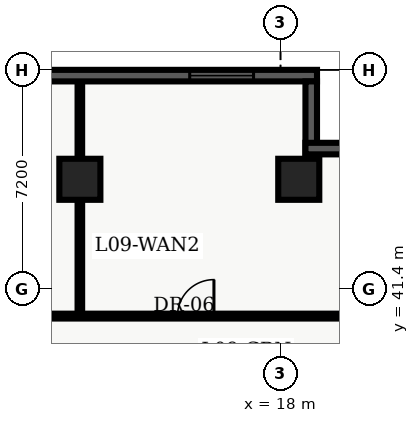
"""IFC4 building model, lengths in metres.
Left out: names, types, materials, properties, quantities, classifications, styles, units other than length and angle.
Written with IfcOpenShell. Run it as: python <this file> out.ifc"""

import sys

from ifc_helpers import new_model, entity, si_unit, converted_unit, direction, frame, origin_with_axes, origin_2d_with_axis, place, context, subcontext, project, spatial, polyline, rectangle, outline, extrude, element, fill, save


model = new_model("IFC4")
c1 = context("Model", 3, precision=1e-05, world=origin_with_axes(), true_north=direction((0.0, 1.0)))
c2 = subcontext(c1, "Body", "Model", "MODEL_VIEW")
j1 = project(units=[si_unit("LENGTHUNIT", "METRE"), converted_unit("PLANEANGLEUNIT", "DEGREE", entity("IfcPlaneAngleMeasure", 0.017), si_unit("PLANEANGLEUNIT", "RADIAN"), dimensions=[0, 0, 0, 0, 0, 0, 0])], contexts=[c1])
p1 = place(None, origin_with_axes())
s1 = spatial("IfcSite", under=j1, at=p1, CompositionType="ELEMENT")
p2 = place(p1, origin_with_axes())
s2 = spatial("IfcBuilding", under=s1, at=p2, CompositionType="ELEMENT")
p3 = place(p2, frame((0.0, 0.0, 40.5), z_axis=(0.0, 0.0, 1.0), x_axis=(1.0, 0.0, 0.0)))
s3 = spatial("IfcBuildingStorey", under=s2, at=p3, CompositionType="ELEMENT", Elevation=40.5)
for number, where, z_axis, x_axis in (
    (1, (11.4, 45.0, 0.0), (0.0, 0.0, 1.0), (1.0, 0.0, 0.0)),
    (2, (18.6, 45.0, 0.0), (0.0, 0.0, 1.0), (1.0, 0.0, 0.0)),
):
    element("IfcColumn", number, at=place(p3, frame(where, z_axis=z_axis, x_axis=x_axis)), inside=s3, PredefinedType="COLUMN", context=c2, shape_type="SweptSolid", body=[
        extrude(rectangle(XDim=1.35, YDim=1.35, at=origin_2d_with_axis()), origin_with_axes(), (0.0, 0.0, 1.0), 3.9),
    ])
p4 = place(p3, frame((2.6, 40.5, 0.0), z_axis=(0.0, 0.0, 1.0), x_axis=(1.0, 0.0, 0.0)))
e3 = element("IfcWall", 3, at=p4, inside=s3, PredefinedType="PARTITIONING", context=c2, shape_type="SweptSolid", body=[
    extrude(outline(polyline([(0.0, -0.08), (18.65, -0.08), (18.65, 0.08), (0.0, 0.08), (0.0, -0.08)])), origin_with_axes(), (0.0, 0.0, 1.0), 2.7),
])
p5 = place(p4, frame((5.275, 0.0, 0.0), z_axis=(0.0, 0.0, 1.0), x_axis=(1.0, 0.0, 0.0)))
e4 = element("IfcOpeningElement", 4, at=p5, cuts=e3, PredefinedType="OPENING", context=c2, shape_type="SweptSolid", body=[
    extrude(rectangle(XDim=1.0, YDim=0.18, at=origin_2d_with_axis()), origin_with_axes(), (0.0, 0.0, 1.0), 2.15),
])
p6 = place(p4, frame((12.61, 0.0, 0.0), z_axis=(0.0, 0.0, 1.0), x_axis=(1.0, 0.0, 0.0)))
e5 = element("IfcOpeningElement", 5, at=p6, cuts=e3, PredefinedType="OPENING", context=c2, shape_type="SweptSolid", body=[
    extrude(rectangle(XDim=1.2, YDim=0.18, at=origin_2d_with_axis()), origin_with_axes(), (0.0, 0.0, 1.0), 2.2),
])
p7 = place(p3, frame((11.4, 40.6, 0.0), z_axis=(0.0, 0.0, 1.0), x_axis=(0.0, 1.0, 0.0)))
e6 = element("IfcWall", 6, at=p7, inside=s3, PredefinedType="PARTITIONING", context=c2, shape_type="SweptSolid", body=[
    extrude(outline(polyline([(0.0, -0.075), (7.64, -0.075), (7.64, 0.075), (0.0, 0.075), (0.0, -0.075)])), origin_with_axes(), (0.0, 0.0, 1.0), 2.7),
])
p8 = place(p3, frame((2.78, 48.41, 0.0), z_axis=(0.0, 0.0, 1.0), x_axis=(1.0, 0.0, 0.0)))
e7 = element("IfcWall", 7, at=p8, inside=s3, PredefinedType="SOLIDWALL", context=c2, shape_type="SweptSolid", body=[
    extrude(outline(polyline([(0.0, -0.19), (16.42, -0.19), (16.42, 0.19), (0.0, 0.19), (0.0, -0.19)])), origin_with_axes(), (0.0, 0.0, 1.0), 3.66),
])
p9 = place(p8, frame((3.137, 0.0, 0.45), z_axis=(0.0, 0.0, 1.0), x_axis=(1.0, 0.0, 0.0)))
e8 = element("IfcOpeningElement", 8, at=p9, cuts=e7, PredefinedType="OPENING", context=c2, shape_type="SweptSolid", body=[
    extrude(rectangle(XDim=2.1, YDim=0.4, at=origin_2d_with_axis()), origin_with_axes(), (0.0, 0.0, 1.0), 2.2),
])
p10 = place(p8, frame((13.283, 0.0, 0.45), z_axis=(0.0, 0.0, 1.0), x_axis=(1.0, 0.0, 0.0)))
e9 = element("IfcOpeningElement", 9, at=p10, cuts=e7, PredefinedType="OPENING", context=c2, shape_type="SweptSolid", body=[
    extrude(rectangle(XDim=2.1, YDim=0.4, at=origin_2d_with_axis()), origin_with_axes(), (0.0, 0.0, 1.0), 2.2),
])
p11 = place(p3, frame((19.01, 48.22, 0.0), z_axis=(0.0, 0.0, 1.0), x_axis=(0.0, -1.0, 0.0)))
e10 = element("IfcWall", 10, at=p11, inside=s3, PredefinedType="SOLIDWALL", context=c2, shape_type="SweptSolid", body=[
    extrude(outline(polyline([(0.0, -0.19), (2.56, -0.19), (2.56, 0.19), (0.0, 0.19), (0.0, -0.19)])), origin_with_axes(), (0.0, 0.0, 1.0), 3.66),
])
p12 = place(p3, frame((18.82, 46.01, 0.0), z_axis=(0.0, 0.0, 1.0), x_axis=(1.0, 0.0, 0.0)))
e11 = element("IfcWall", 11, at=p12, inside=s3, PredefinedType="SOLIDWALL", context=c2, shape_type="SweptSolid", body=[
    extrude(outline(polyline([(0.0, -0.19), (2.78, -0.19), (2.78, 0.19), (0.0, 0.19), (0.0, -0.19)])), origin_with_axes(), (0.0, 0.0, 1.0), 3.66),
])
p13 = place(p4, frame((12.61, 0.0, 0.0), z_axis=(0.0, 0.0, 1.0), x_axis=(1.0, 0.0, 0.0)))
e12 = element("IfcDoor", 12, at=p13, inside=s3, OperationType="SINGLE_SWING_RIGHT", PredefinedType="DOOR", context=c2, shape_type="SweptSolid", body=[
    extrude(rectangle(XDim=1.2, YDim=0.09, at=origin_2d_with_axis()), origin_with_axes(), (0.0, 0.0, 1.0), 2.2),
])
fill(e5, e12)
p14 = place(p8, frame((13.283, 0.0, 0.45), z_axis=(0.0, 0.0, 1.0), x_axis=(1.0, 0.0, 0.0)))
e13 = element("IfcWindow", 13, at=p14, inside=s3, PredefinedType="WINDOW", context=c2, shape_type="SweptSolid", body=[
    extrude(rectangle(XDim=2.1, YDim=0.09, at=origin_2d_with_axis()), origin_with_axes(), (0.0, 0.0, 1.0), 2.2),
])
fill(e9, e13)
save(model, sys.argv[1])
